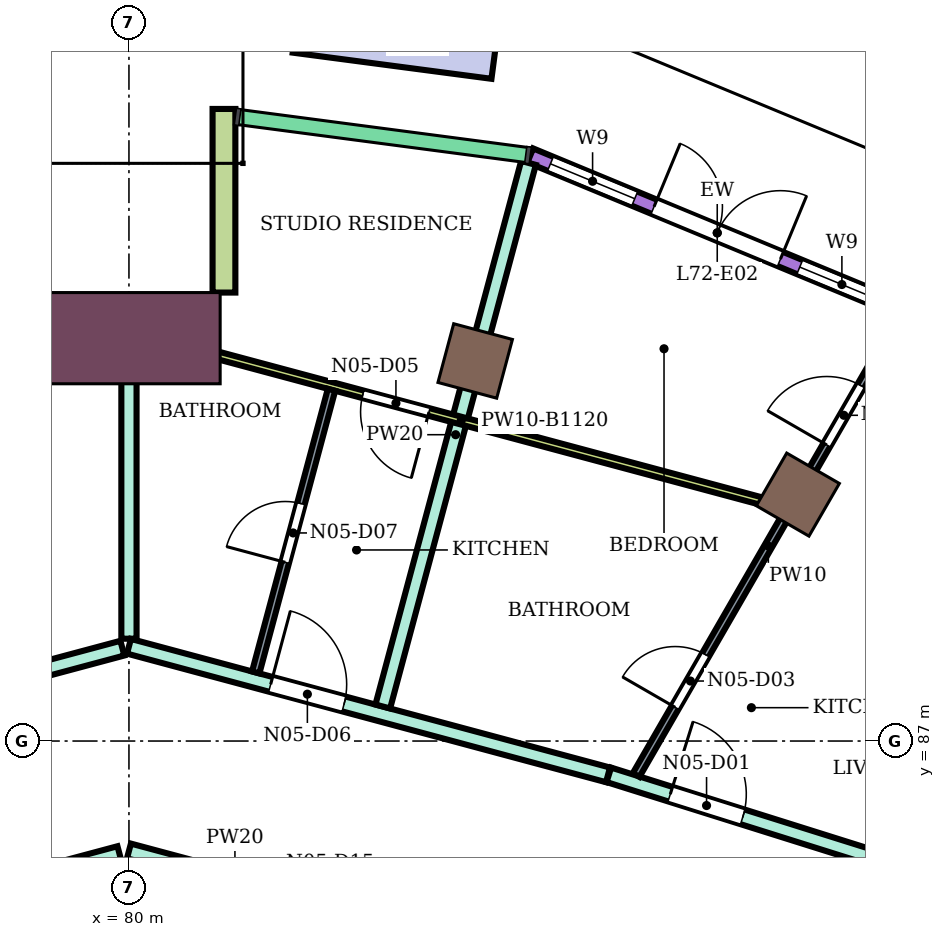
"""IFC4 building model, lengths in metres.
Left out: names, types, materials, properties, quantities, classifications, styles, units other than length and angle.
Written with IfcOpenShell. Run it as: python <this file> out.ifc"""

import sys

from ifc_helpers import new_model, si_unit, direction, frame, frame_2d, origin, origin_2d, place, context, subcontext, project, spatial, rectangle, extrude, element, fill, save


model = new_model("IFC4")
c1 = context("Model", 3, precision=1e-05, world=origin(), true_north=direction((0.0, 1.0)))
c2 = subcontext(c1, "Body", "Model", "MODEL_VIEW")
j1 = project(units=[si_unit("LENGTHUNIT", "METRE"), si_unit("PLANEANGLEUNIT", "RADIAN")], contexts=[c1])
p1 = place(None, origin())
s1 = spatial("IfcSite", under=j1, at=p1, CompositionType="ELEMENT")
p2 = place(p1, origin())
s2 = spatial("IfcBuilding", under=s1, at=p2, CompositionType="ELEMENT")
p3 = place(p2, frame((0.0, 0.0, 314.9)))
s3 = spatial("IfcBuildingStorey", under=s2, at=p3, CompositionType="ELEMENT", Elevation=314.9)
for number, where, z_axis, x_axis in (
    (1, (88.8, 90.242, 0.0), (0.0, 0.0, 1.0), (0.5, 0.866, 0.0)),
    (2, (84.555, 92.0, 0.0), (0.0, 0.0, 1.0), (0.259, 0.966, 0.0)),
):
    element("IfcColumn", number, at=place(p3, frame(where, z_axis=z_axis, x_axis=x_axis)), inside=s3, PredefinedType="COLUMN", context=c2, shape_type="SweptSolid", body=[
        extrude(rectangle(XDim=0.8, YDim=0.8, at=origin_2d()), origin(), (0.0, 0.0, 1.0), 4.4),
    ])
p4 = place(p3, frame((80.0, 92.3, 0.0), z_axis=(0.0, 0.0, 1.0), x_axis=(0.0, 1.0, 0.0)))
e3 = element("IfcColumn", 3, at=p4, inside=s3, PredefinedType="COLUMN", context=c2, shape_type="SweptSolid", body=[
    extrude(rectangle(XDim=1.2, YDim=2.4, at=origin_2d()), origin(), (0.0, 0.0, 1.0), 4.4),
])
p5 = place(p3, frame((90.199, 92.666, 0.0), z_axis=(0.0, 0.0, 1.0), x_axis=(-0.923876574156, 0.382690574388, 0.0)))
e4 = element("IfcWall", 4, at=p5, inside=s3, PredefinedType="NOTDEFINED", context=c2, shape_type="SweptSolid", body=[
    extrude(rectangle(XDim=5.325, YDim=0.2, at=frame_2d((2.663, 0.0))), origin(), (0.0, 0.0, 1.0), 4.4),
])
p6 = place(p5, frame((0.288, 0.0, 0.9)))
e5 = element("IfcOpeningElement", 5, at=p6, cuts=e4, PredefinedType="OPENING", context=c2, shape_type="SweptSolid", body=[
    extrude(rectangle(XDim=1.2, YDim=2.7, at=frame_2d((0.6, 1.35))), frame((0.0, 0.11, 0.0), z_axis=(0.0, -1.0, 0.0), x_axis=(1.0, 0.0, 0.0)), (0.0, 0.0, 1.0), 0.22),
])
p7 = place(p5, frame((1.763, 0.0, 0.0)))
e6 = element("IfcOpeningElement", 6, at=p7, cuts=e4, PredefinedType="OPENING", context=c2, shape_type="SweptSolid", body=[
    extrude(rectangle(XDim=1.8, YDim=2.7, at=frame_2d((0.9, 1.35))), frame((0.0, 0.11, 0.0), z_axis=(0.0, -1.0, 0.0), x_axis=(1.0, 0.0, 0.0)), (0.0, 0.0, 1.0), 0.22),
])
p8 = place(p5, frame((3.838, 0.0, 0.9)))
e7 = element("IfcOpeningElement", 7, at=p8, cuts=e4, PredefinedType="OPENING", context=c2, shape_type="SweptSolid", body=[
    extrude(rectangle(XDim=1.2, YDim=2.7, at=frame_2d((0.6, 1.35))), frame((0.0, 0.11, 0.0), z_axis=(0.0, -1.0, 0.0), x_axis=(1.0, 0.0, 0.0)), (0.0, 0.0, 1.0), 0.22),
])
p9 = place(p3, frame((81.25, 92.9, 0.0), z_axis=(0.0, 0.0, 1.0), x_axis=(0.0, 1.0, 0.0)))
e8 = element("IfcWall", 8, at=p9, inside=s3, PredefinedType="NOTDEFINED", context=c2, shape_type="SweptSolid", body=[
    extrude(rectangle(XDim=2.416, YDim=0.3, at=frame_2d((1.208, 0.0))), origin(), (0.0, 0.0, 1.0), 4.4),
])
p10 = place(p3, frame((84.808, 96.01, 0.0), z_axis=(0.0, 0.0, 1.0), x_axis=(-0.991436014481, 0.130593373453, 0.0)))
e9 = element("IfcWall", 9, at=p10, inside=s3, PredefinedType="USERDEFINED", context=c2, shape_type="SweptSolid", body=[
    extrude(rectangle(XDim=2.638, YDim=0.6, at=frame_2d((1.319, 0.0))), origin(), (0.0, 0.0, 1.0), 0.6),
])
p11 = place(p3, frame((73.687, 86.554, 0.0), z_axis=(0.0, 0.0, 1.0), x_axis=(0.96595903825, 0.258695064551, 0.0)))
e10 = element("IfcWall", 10, at=p11, inside=s3, PredefinedType="PARTITIONING", context=c2, shape_type="SweptSolid", body=[
    extrude(rectangle(XDim=6.446, YDim=0.2, at=frame_2d((3.223, 0.0))), origin(), (0.0, 0.0, 1.0), 3.95),
])
p12 = place(p11, frame((3.638, 0.0, 0.0)))
e11 = element("IfcOpeningElement", 11, at=p12, cuts=e10, PredefinedType="OPENING", context=c2, shape_type="SweptSolid", body=[
    extrude(rectangle(XDim=1.0, YDim=2.1, at=frame_2d((0.5, 1.05))), frame((0.0, 0.11, 0.0), z_axis=(0.0, -1.0, 0.0), x_axis=(1.0, 0.0, 0.0)), (0.0, 0.0, 1.0), 0.22),
])
p13 = place(p3, frame((74.413, 84.057, 0.0), z_axis=(0.0, 0.0, 1.0), x_axis=(0.965972135939, 0.258646153246, 0.0)))
e12 = element("IfcWall", 12, at=p13, inside=s3, PredefinedType="PARTITIONING", context=c2, shape_type="SweptSolid", body=[
    extrude(rectangle(XDim=5.654, YDim=0.2, at=frame_2d((2.827, 0.0))), origin(), (0.0, 0.0, 1.0), 3.95),
])
p14 = place(p13, frame((2.593, 0.0, 0.0)))
e13 = element("IfcOpeningElement", 13, at=p14, cuts=e12, PredefinedType="OPENING", context=c2, shape_type="SweptSolid", body=[
    extrude(rectangle(XDim=0.9, YDim=2.1, at=frame_2d((0.45, 1.05))), frame((0.0, 0.11, 0.0), z_axis=(0.0, -1.0, 0.0), x_axis=(1.0, 0.0, 0.0)), (0.0, 0.0, 1.0), 0.22),
])
p15 = place(p3, frame((80.0, 85.554, 0.0), z_axis=(0.0, 0.0, 1.0), x_axis=(0.965928989968, -0.258807237802, 0.0)))
e14 = element("IfcWall", 14, at=p15, inside=s3, PredefinedType="PARTITIONING", context=c2, shape_type="SweptSolid", body=[
    extrude(rectangle(XDim=5.774, YDim=0.2, at=frame_2d((2.887, 0.0))), origin(), (0.0, 0.0, 1.0), 3.95),
])
p16 = place(p15, frame((2.292, 0.0, 0.0)))
e15 = element("IfcOpeningElement", 15, at=p16, cuts=e14, PredefinedType="OPENING", context=c2, shape_type="SweptSolid", body=[
    extrude(rectangle(XDim=0.9, YDim=2.1, at=frame_2d((0.45, 1.05))), frame((0.0, 0.11, 0.0), z_axis=(0.0, -1.0, 0.0), x_axis=(1.0, 0.0, 0.0)), (0.0, 0.0, 1.0), 0.22),
])
p17 = place(p3, frame((80.0, 88.346, 0.0), z_axis=(0.0, 0.0, 1.0), x_axis=(0.0, 1.0, 0.0)))
e16 = element("IfcWall", 16, at=p17, inside=s3, PredefinedType="PARTITIONING", context=c2, shape_type="SweptSolid", body=[
    extrude(rectangle(XDim=4.354, YDim=0.2, at=frame_2d((2.177, 0.0))), origin(), (0.0, 0.0, 1.0), 3.95),
])
p18 = place(p3, frame((80.0, 88.247, 0.0), z_axis=(0.0, 0.0, 1.0), x_axis=(0.965807659316, -0.259259648244, 0.0)))
e17 = element("IfcWall", 17, at=p18, inside=s3, PredefinedType="PARTITIONING", context=c2, shape_type="SweptSolid", body=[
    extrude(rectangle(XDim=6.526, YDim=0.2, at=frame_2d((3.263, 0.0))), origin(), (0.0, 0.0, 1.0), 3.95),
])
p19 = place(p18, frame((1.93, 0.0, 0.0)))
e18 = element("IfcOpeningElement", 18, at=p19, cuts=e17, PredefinedType="OPENING", context=c2, shape_type="SweptSolid", body=[
    extrude(rectangle(XDim=1.0, YDim=2.1, at=frame_2d((0.5, 1.05))), frame((0.0, 0.11, 0.0), z_axis=(0.0, -1.0, 0.0), x_axis=(1.0, 0.0, 0.0)), (0.0, 0.0, 1.0), 0.22),
])
p20 = place(p3, frame((83.339, 87.455, 0.0), z_axis=(0.0, 0.0, 1.0), x_axis=(0.258957498737, 0.965888717114, 0.0)))
e19 = element("IfcWall", 19, at=p20, inside=s3, PredefinedType="PARTITIONING", context=c2, shape_type="SweptSolid", body=[
    extrude(rectangle(XDim=7.404, YDim=0.2, at=frame_2d((3.702, 0.0))), origin(), (0.0, 0.0, 1.0), 3.95),
])
p21 = place(p3, frame((86.313, 86.555, 0.0), z_axis=(0.0, 0.0, 1.0), x_axis=(0.9540216201, -0.299737799389, 0.0)))
e20 = element("IfcWall", 20, at=p21, inside=s3, PredefinedType="PARTITIONING", context=c2, shape_type="SweptSolid", body=[
    extrude(rectangle(XDim=5.719, YDim=0.2, at=frame_2d((2.86, 0.0))), origin(), (0.0, 0.0, 1.0), 3.95),
])
p22 = place(p21, frame((0.848, 0.0, 0.0)))
e21 = element("IfcOpeningElement", 21, at=p22, cuts=e20, PredefinedType="OPENING", context=c2, shape_type="SweptSolid", body=[
    extrude(rectangle(XDim=1.0, YDim=2.1, at=frame_2d((0.5, 1.05))), frame((0.0, 0.11, 0.0), z_axis=(0.0, -1.0, 0.0), x_axis=(1.0, 0.0, 0.0)), (0.0, 0.0, 1.0), 0.22),
])
p23 = place(p3, frame((80.106, 92.359, 0.0), z_axis=(0.0, 0.0, 1.0), x_axis=(0.965889909151, -0.258953052501, 0.0)))
e22 = element("IfcWall", 22, at=p23, inside=s3, PredefinedType="PARTITIONING", context=c2, shape_type="SweptSolid", body=[
    extrude(rectangle(XDim=8.83, YDim=0.1, at=frame_2d((4.415, 0.0))), origin(), (0.0, 0.0, 1.0), 3.28),
])
p24 = place(p23, frame((3.076, 0.0, 0.0)))
e23 = element("IfcOpeningElement", 23, at=p24, cuts=e22, PredefinedType="OPENING", context=c2, shape_type="SweptSolid", body=[
    extrude(rectangle(XDim=0.9, YDim=2.1, at=frame_2d((0.45, 1.05))), frame((0.0, 0.06, 0.0), z_axis=(0.0, -1.0, 0.0), x_axis=(1.0, 0.0, 0.0)), (0.0, 0.0, 1.0), 0.12),
])
p25 = place(p3, frame((81.668, 87.903, 0.0), z_axis=(0.0, 0.0, 1.0), x_axis=(0.259020336752, 0.965871867873, 0.0)))
e24 = element("IfcWall", 24, at=p25, inside=s3, PredefinedType="PARTITIONING", context=c2, shape_type="SweptSolid", body=[
    extrude(rectangle(XDim=3.849, YDim=0.1, at=frame_2d((1.925, 0.0))), origin(), (0.0, 0.0, 1.0), 3.95),
])
p26 = place(p25, frame((1.5, 0.0, 0.0)))
e25 = element("IfcOpeningElement", 25, at=p26, cuts=e24, PredefinedType="OPENING", context=c2, shape_type="SweptSolid", body=[
    extrude(rectangle(XDim=0.8, YDim=2.1, at=frame_2d((0.4, 1.05))), frame((0.0, 0.06, 0.0), z_axis=(0.0, -1.0, 0.0), x_axis=(1.0, 0.0, 0.0)), (0.0, 0.0, 1.0), 0.12),
])
p27 = place(p3, frame((86.673, 86.553, 0.0), z_axis=(0.0, 0.0, 1.0), x_axis=(0.500103298341, 0.865965756245, 0.0)))
e26 = element("IfcWall", 26, at=p27, inside=s3, PredefinedType="PARTITIONING", context=c2, shape_type="SweptSolid", body=[
    extrude(rectangle(XDim=6.955, YDim=0.1, at=frame_2d((3.477, 0.0))), origin(), (0.0, 0.0, 1.0), 3.95),
])
p28 = place(p27, frame((5.015, 0.0, 0.0)))
e27 = element("IfcOpeningElement", 27, at=p28, cuts=e26, PredefinedType="OPENING", context=c2, shape_type="SweptSolid", body=[
    extrude(rectangle(XDim=0.9, YDim=2.1, at=frame_2d((0.45, 1.05))), frame((0.0, 0.06, 0.0), z_axis=(0.0, -1.0, 0.0), x_axis=(1.0, 0.0, 0.0)), (0.0, 0.0, 1.0), 0.12),
])
p29 = place(p27, frame((1.028, 0.0, 0.0)))
e28 = element("IfcOpeningElement", 28, at=p29, cuts=e26, PredefinedType="OPENING", context=c2, shape_type="SweptSolid", body=[
    extrude(rectangle(XDim=0.8, YDim=2.1, at=frame_2d((0.4, 1.05))), frame((0.0, 0.06, 0.0), z_axis=(0.0, -1.0, 0.0), x_axis=(1.0, 0.0, 0.0)), (0.0, 0.0, 1.0), 0.12),
])
p30 = place(p6, origin())
e29 = element("IfcWindow", 29, at=p30, inside=s3, PartitioningType="SINGLE_PANEL", PredefinedType="WINDOW", context=c2, shape_type="SweptSolid", body=[
    extrude(rectangle(XDim=1.2, YDim=2.7, at=frame_2d((0.6, 1.35))), frame((0.0, 0.03, 0.0), z_axis=(0.0, -1.0, 0.0), x_axis=(1.0, 0.0, 0.0)), (0.0, 0.0, 1.0), 0.06),
])
fill(e5, e29)
p31 = place(p7, frame((1.8, 0.0, 0.0), z_axis=(0.0, 0.0, 1.0), x_axis=(-1.0, 0.0, 0.0)))
e30 = element("IfcDoor", 30, at=p31, inside=s3, OperationType="DOUBLE_DOOR_SINGLE_SWING", PredefinedType="DOOR", context=c2, shape_type="SweptSolid", body=[
    extrude(rectangle(XDim=1.8, YDim=2.7, at=frame_2d((0.9, 1.35))), frame((0.0, 0.025, 0.0), z_axis=(0.0, -1.0, 0.0), x_axis=(1.0, 0.0, 0.0)), (0.0, 0.0, 1.0), 0.05),
])
fill(e6, e30)
p32 = place(p8, origin())
e31 = element("IfcWindow", 31, at=p32, inside=s3, PartitioningType="SINGLE_PANEL", PredefinedType="WINDOW", context=c2, shape_type="SweptSolid", body=[
    extrude(rectangle(XDim=1.2, YDim=2.7, at=frame_2d((0.6, 1.35))), frame((0.0, 0.03, 0.0), z_axis=(0.0, -1.0, 0.0), x_axis=(1.0, 0.0, 0.0)), (0.0, 0.0, 1.0), 0.06),
])
fill(e7, e31)
p33 = place(p22, origin())
e32 = element("IfcDoor", 32, at=p33, inside=s3, OperationType="SINGLE_SWING_LEFT", PredefinedType="DOOR", context=c2, shape_type="SweptSolid", body=[
    extrude(rectangle(XDim=1.0, YDim=2.1, at=frame_2d((0.5, 1.05))), frame((0.0, 0.025, 0.0), z_axis=(0.0, -1.0, 0.0), x_axis=(1.0, 0.0, 0.0)), (0.0, 0.0, 1.0), 0.05),
])
fill(e21, e32)
p34 = place(p28, origin())
e33 = element("IfcDoor", 33, at=p34, inside=s3, OperationType="SINGLE_SWING_LEFT", PredefinedType="DOOR", context=c2, shape_type="SweptSolid", body=[
    extrude(rectangle(XDim=0.9, YDim=2.1, at=frame_2d((0.45, 1.05))), frame((0.0, 0.025, 0.0), z_axis=(0.0, -1.0, 0.0), x_axis=(1.0, 0.0, 0.0)), (0.0, 0.0, 1.0), 0.05),
])
fill(e27, e33)
p35 = place(p29, origin())
e34 = element("IfcDoor", 34, at=p35, inside=s3, OperationType="SINGLE_SWING_LEFT", PredefinedType="DOOR", context=c2, shape_type="SweptSolid", body=[
    extrude(rectangle(XDim=0.8, YDim=2.1, at=frame_2d((0.4, 1.05))), frame((0.0, 0.025, 0.0), z_axis=(0.0, -1.0, 0.0), x_axis=(1.0, 0.0, 0.0)), (0.0, 0.0, 1.0), 0.05),
])
fill(e28, e34)
p36 = place(p24, frame((0.9, 0.0, 0.0), z_axis=(0.0, 0.0, 1.0), x_axis=(-1.0, 0.0, 0.0)))
e35 = element("IfcDoor", 35, at=p36, inside=s3, OperationType="SINGLE_SWING_LEFT", PredefinedType="DOOR", context=c2, shape_type="SweptSolid", body=[
    extrude(rectangle(XDim=0.9, YDim=2.1, at=frame_2d((0.45, 1.05))), frame((0.0, 0.025, 0.0), z_axis=(0.0, -1.0, 0.0), x_axis=(1.0, 0.0, 0.0)), (0.0, 0.0, 1.0), 0.05),
])
fill(e23, e35)
p37 = place(p19, origin())
e36 = element("IfcDoor", 36, at=p37, inside=s3, OperationType="SINGLE_SWING_LEFT", PredefinedType="DOOR", context=c2, shape_type="SweptSolid", body=[
    extrude(rectangle(XDim=1.0, YDim=2.1, at=frame_2d((0.5, 1.05))), frame((0.0, 0.025, 0.0), z_axis=(0.0, -1.0, 0.0), x_axis=(1.0, 0.0, 0.0)), (0.0, 0.0, 1.0), 0.05),
])
fill(e18, e36)
p38 = place(p26, origin())
e37 = element("IfcDoor", 37, at=p38, inside=s3, OperationType="SINGLE_SWING_LEFT", PredefinedType="DOOR", context=c2, shape_type="SweptSolid", body=[
    extrude(rectangle(XDim=0.8, YDim=2.1, at=frame_2d((0.4, 1.05))), frame((0.0, 0.025, 0.0), z_axis=(0.0, -1.0, 0.0), x_axis=(1.0, 0.0, 0.0)), (0.0, 0.0, 1.0), 0.05),
])
fill(e25, e37)
save(model, sys.argv[1])
